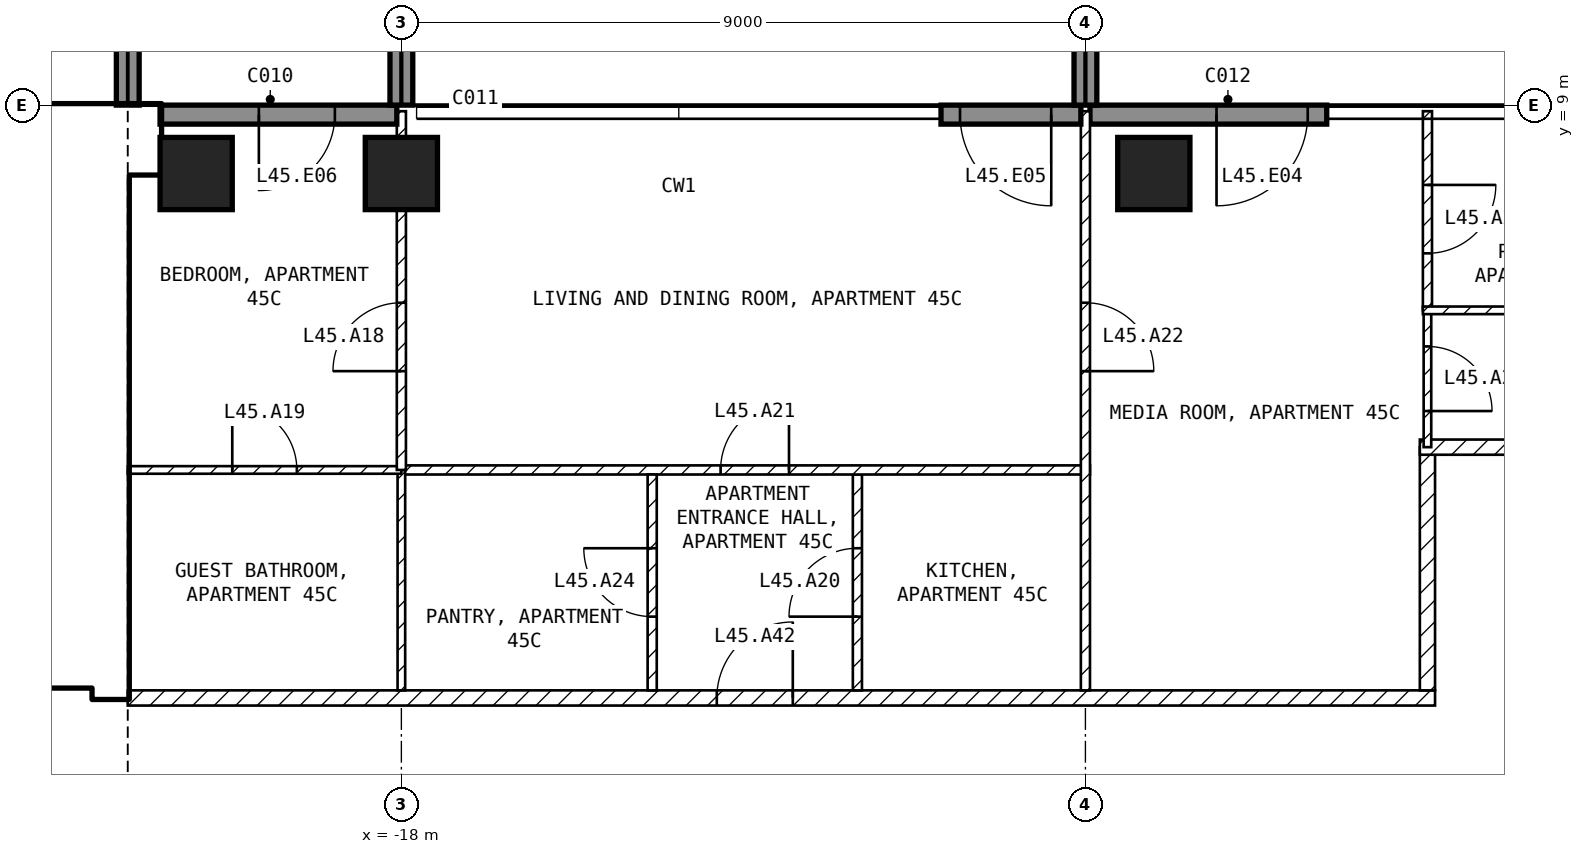
"""IFC4 building model, lengths in metres.
Left out: names, types, materials, properties, quantities, classifications, styles, units other than length and angle.
Written with IfcOpenShell. Run it as: python <this file> out.ifc"""

import sys

from ifc_helpers import new_model, si_unit, direction, frame, frame_2d, origin, origin_2d, place, context, subcontext, project, spatial, rectangle, extrude, element, fill, save


model = new_model("IFC4")
c1 = context("Model", 3, precision=1e-05, world=origin(), true_north=direction((0.0, 1.0)))
c2 = subcontext(c1, "Body", "Model", "MODEL_VIEW")
j1 = project(units=[si_unit("LENGTHUNIT", "METRE"), si_unit("PLANEANGLEUNIT", "RADIAN")], contexts=[c1])
p1 = place(None, origin())
s1 = spatial("IfcSite", under=j1, at=p1, CompositionType="ELEMENT")
p2 = place(p1, origin())
s2 = spatial("IfcBuilding", under=s1, at=p2, CompositionType="ELEMENT")
p3 = place(p2, frame((0.0, 0.0, 184.1)))
s3 = spatial("IfcBuildingStorey", under=s2, at=p3, CompositionType="ELEMENT", Elevation=184.1)
for number, where, z_axis, x_axis in (
    (1, (-20.7, 8.1, -0.25), (0.0, 0.0, 1.0), (1.0, 0.0, 0.0)),
    (2, (-18.0, 8.1, -0.25), (0.0, 0.0, 1.0), (1.0, 0.0, 0.0)),
    (3, (-8.1, 8.1, -0.25), (0.0, 0.0, 1.0), (1.0, 0.0, 0.0)),
):
    element("IfcColumn", number, at=place(p3, frame(where, z_axis=z_axis, x_axis=x_axis)), inside=s3, PredefinedType="COLUMN", context=c2, shape_type="SweptSolid", body=[
        extrude(rectangle(XDim=0.95, YDim=0.95, at=origin_2d()), origin(), (0.0, 0.0, 1.0), 3.5),
    ])
p4 = place(p3, frame((-5.825, 8.875, 0.0), z_axis=(0.0, 0.0, 1.0), x_axis=(-1.0, 0.0, 0.0)))
e4 = element("IfcWall", 4, at=p4, inside=s3, PredefinedType="SOLIDWALL", context=c2, shape_type="SweptSolid", body=[
    extrude(rectangle(XDim=3.115, YDim=0.25, at=frame_2d((1.558, 0.0))), origin(), (0.0, 0.0, 1.0), 3.25),
])
p5 = place(p4, frame((0.25, 0.0, 0.0)))
e5 = element("IfcOpeningElement", 5, at=p5, cuts=e4, PredefinedType="OPENING", context=c2, shape_type="SweptSolid", body=[
    extrude(rectangle(XDim=1.2, YDim=2.4, at=frame_2d((0.6, 1.2))), frame((0.0, 0.135, 0.0), z_axis=(0.0, -1.0, 0.0), x_axis=(1.0, 0.0, 0.0)), (0.0, 0.0, 1.0), 0.27),
])
p6 = place(p3, frame((-9.06, 8.875, 0.0), z_axis=(0.0, 0.0, 1.0), x_axis=(-1.0, 0.0, 0.0)))
e6 = element("IfcWall", 6, at=p6, inside=s3, PredefinedType="SOLIDWALL", context=c2, shape_type="SweptSolid", body=[
    extrude(rectangle(XDim=1.84, YDim=0.25, at=frame_2d((0.92, 0.0))), origin(), (0.0, 0.0, 1.0), 3.25),
])
p7 = place(p6, frame((0.39, 0.0, 0.0)))
e7 = element("IfcOpeningElement", 7, at=p7, cuts=e6, PredefinedType="OPENING", context=c2, shape_type="SweptSolid", body=[
    extrude(rectangle(XDim=1.2, YDim=2.4, at=frame_2d((0.6, 1.2))), frame((0.0, 0.135, 0.0), z_axis=(0.0, -1.0, 0.0), x_axis=(1.0, 0.0, 0.0)), (0.0, 0.0, 1.0), 0.27),
])
p8 = place(p3, frame((-18.06, 8.875, 0.0), z_axis=(0.0, 0.0, 1.0), x_axis=(-1.0, 0.0, 0.0)))
e8 = element("IfcWall", 8, at=p8, inside=s3, PredefinedType="SOLIDWALL", context=c2, shape_type="SweptSolid", body=[
    extrude(rectangle(XDim=3.115, YDim=0.25, at=frame_2d((1.558, 0.0))), origin(), (0.0, 0.0, 1.0), 3.25),
])
p9 = place(p8, frame((0.815, 0.0, 0.0)))
e9 = element("IfcOpeningElement", 9, at=p9, cuts=e8, PredefinedType="OPENING", context=c2, shape_type="SweptSolid", body=[
    extrude(rectangle(XDim=1.0, YDim=2.4, at=frame_2d((0.5, 1.2))), frame((0.0, 0.135, 0.0), z_axis=(0.0, -1.0, 0.0), x_axis=(1.0, 0.0, 0.0)), (0.0, 0.0, 1.0), 0.27),
])
for number, where, z_axis, x_axis in (
    (10, (-21.6, 9.0, 0.0), (0.0, 0.0, 1.0), (0.0, 1.0, 0.0)),
    (11, (-18.0, 9.0, 0.0), (0.0, 0.0, 1.0), (0.0, 1.0, 0.0)),
    (12, (-9.0, 9.0, 0.0), (0.0, 0.0, 1.0), (0.0, 1.0, 0.0)),
):
    element("IfcWall", number, at=place(p3, frame(where, z_axis=z_axis, x_axis=x_axis)), inside=s3, PredefinedType="SOLIDWALL", context=c2, shape_type="SweptSolid", body=[
        extrude(rectangle(XDim=2.7, YDim=0.3, at=frame_2d((1.35, 0.0))), origin(), (0.0, 0.0, 1.0), 3.25),
    ])
p10 = place(p3, frame((-29.6, 8.55, 0.0), z_axis=(0.0, 0.0, 1.0), x_axis=(1.0, 0.0, 0.0)))
e13 = element("IfcWall", 13, at=p10, inside=s3, PredefinedType="SHEAR", context=c2, shape_type="SweptSolid", body=[
    extrude(rectangle(XDim=8.425, YDim=0.9, at=frame_2d((4.212, 0.0))), origin(), (0.0, 0.0, 1.0), 3.25),
])
p11 = place(p3, frame((-21.825, 1.2, 0.0), z_axis=(0.0, 0.0, 1.0), x_axis=(0.0, 1.0, 0.0)))
e14 = element("IfcWall", 14, at=p11, inside=s3, PredefinedType="SHEAR", context=c2, shape_type="SweptSolid", body=[
    extrude(rectangle(XDim=6.9, YDim=0.45, at=frame_2d((3.45, 0.0))), origin(), (0.0, 0.0, 1.0), 3.25),
])
p12 = place(p3, frame((-33.2, 1.45, 0.0), z_axis=(0.0, 0.0, 1.0), x_axis=(1.0, 0.0, 0.0)))
e15 = element("IfcWall", 15, at=p12, inside=s3, PredefinedType="SOLIDWALL", context=c2, shape_type="SweptSolid", body=[
    extrude(rectangle(XDim=11.15, YDim=0.2, at=frame_2d((5.575, 0.0))), origin(), (0.0, 0.0, 1.0), 3.25),
])
p13 = place(p12, frame((9.4, 0.0, 0.0)))
e16 = element("IfcOpeningElement", 16, at=p13, cuts=e15, PredefinedType="OPENING", context=c2, shape_type="SweptSolid", body=[
    extrude(rectangle(XDim=1.0, YDim=2.1, at=frame_2d((0.5, 1.05))), frame((0.0, 0.11, 0.0), z_axis=(0.0, -1.0, 0.0), x_axis=(1.0, 0.0, 0.0)), (0.0, 0.0, 1.0), 0.22),
])
p14 = place(p12, frame((6.9, 0.0, 0.0)))
e17 = element("IfcOpeningElement", 17, at=p14, cuts=e15, PredefinedType="OPENING", context=c2, shape_type="SweptSolid", body=[
    extrude(rectangle(XDim=1.0, YDim=2.1, at=frame_2d((0.5, 1.05))), frame((0.0, 0.11, 0.0), z_axis=(0.0, -1.0, 0.0), x_axis=(1.0, 0.0, 0.0)), (0.0, 0.0, 1.0), 0.22),
])
p15 = place(p12, frame((1.1, 0.0, 0.0)))
e18 = element("IfcOpeningElement", 18, at=p15, cuts=e15, PredefinedType="OPENING", context=c2, shape_type="SweptSolid", body=[
    extrude(rectangle(XDim=0.9, YDim=2.1, at=frame_2d((0.45, 1.05))), frame((0.0, 0.11, 0.0), z_axis=(0.0, -1.0, 0.0), x_axis=(1.0, 0.0, 0.0)), (0.0, 0.0, 1.0), 0.22),
])
p16 = place(p3, frame((-28.35, 5.15, 0.0), z_axis=(0.0, 0.0, 1.0), x_axis=(1.0, 0.0, 0.0)))
e19 = element("IfcWall", 19, at=p16, inside=s3, PredefinedType="SOLIDWALL", context=c2, shape_type="SweptSolid", body=[
    extrude(rectangle(XDim=6.3, YDim=0.2, at=frame_2d((3.15, 0.0))), origin(), (0.0, 0.0, 1.0), 3.25),
])
p17 = place(p16, frame((5.1, 0.0, 0.0)))
e20 = element("IfcOpeningElement", 20, at=p17, cuts=e19, PredefinedType="OPENING", context=c2, shape_type="SweptSolid", body=[
    extrude(rectangle(XDim=1.0, YDim=2.1, at=frame_2d((0.5, 1.05))), frame((0.0, 0.11, 0.0), z_axis=(0.0, -1.0, 0.0), x_axis=(1.0, 0.0, 0.0)), (0.0, 0.0, 1.0), 0.22),
])
p18 = place(p3, frame((-21.6, 1.2, 0.0), z_axis=(0.0, 0.0, 1.0), x_axis=(1.0, 0.0, 0.0)))
e21 = element("IfcWall", 21, at=p18, inside=s3, PredefinedType="PARTITIONING", context=c2, shape_type="SweptSolid", body=[
    extrude(rectangle(XDim=17.2, YDim=0.2, at=frame_2d((8.6, 0.0))), origin(), (0.0, 0.0, 1.0), 3.25),
])
p19 = place(p18, frame((7.75, 0.0, 0.0)))
e22 = element("IfcOpeningElement", 22, at=p19, cuts=e21, PredefinedType="OPENING", context=c2, shape_type="SweptSolid", body=[
    extrude(rectangle(XDim=1.0, YDim=2.1, at=frame_2d((0.5, 1.05))), frame((0.0, 0.11, 0.0), z_axis=(0.0, -1.0, 0.0), x_axis=(1.0, 0.0, 0.0)), (0.0, 0.0, 1.0), 0.22),
])
p20 = place(p3, frame((-4.5, 1.3, 0.0), z_axis=(0.0, 0.0, 1.0), x_axis=(0.0, 1.0, 0.0)))
e23 = element("IfcWall", 23, at=p20, inside=s3, PredefinedType="PARTITIONING", context=c2, shape_type="SweptSolid", body=[
    extrude(rectangle(XDim=3.2, YDim=0.2, at=frame_2d((1.6, 0.0))), origin(), (0.0, 0.0, 1.0), 3.25),
])
p21 = place(p3, frame((-4.6, 4.5, 0.0), z_axis=(0.0, 0.0, 1.0), x_axis=(1.0, 0.0, 0.0)))
e24 = element("IfcWall", 24, at=p21, inside=s3, PredefinedType="PARTITIONING", context=c2, shape_type="SweptSolid", body=[
    extrude(rectangle(XDim=3.5, YDim=0.2, at=frame_2d((1.75, 0.0))), origin(), (0.0, 0.0, 1.0), 3.25),
])
p22 = place(p3, frame((-12.0, 1.3, 0.0), z_axis=(0.0, 0.0, 1.0), x_axis=(0.0, 1.0, 0.0)))
e25 = element("IfcWall", 25, at=p22, inside=s3, PredefinedType="PARTITIONING", context=c2, shape_type="SweptSolid", body=[
    extrude(rectangle(XDim=2.84, YDim=0.12, at=frame_2d((1.42, 0.0))), origin(), (0.0, 0.0, 1.0), 3.25),
])
p23 = place(p22, frame((0.97, 0.0, 0.0)))
e26 = element("IfcOpeningElement", 26, at=p23, cuts=e25, PredefinedType="OPENING", context=c2, shape_type="SweptSolid", body=[
    extrude(rectangle(XDim=0.9, YDim=2.1, at=frame_2d((0.45, 1.05))), frame((0.0, 0.07, 0.0), z_axis=(0.0, -1.0, 0.0), x_axis=(1.0, 0.0, 0.0)), (0.0, 0.0, 1.0), 0.14),
])
p24 = place(p3, frame((-18.0, 4.2, 0.0), z_axis=(0.0, 0.0, 1.0), x_axis=(1.0, 0.0, 0.0)))
e27 = element("IfcWall", 27, at=p24, inside=s3, PredefinedType="PARTITIONING", context=c2, shape_type="SweptSolid", body=[
    extrude(rectangle(XDim=9.06, YDim=0.12, at=frame_2d((4.53, 0.0))), origin(), (0.0, 0.0, 1.0), 3.25),
])
p25 = place(p24, frame((4.2, 0.0, 0.0)))
e28 = element("IfcOpeningElement", 28, at=p25, cuts=e27, PredefinedType="OPENING", context=c2, shape_type="SweptSolid", body=[
    extrude(rectangle(XDim=0.9, YDim=2.1, at=frame_2d((0.45, 1.05))), frame((0.0, 0.07, 0.0), z_axis=(0.0, -1.0, 0.0), x_axis=(1.0, 0.0, 0.0)), (0.0, 0.0, 1.0), 0.14),
])
p26 = place(p3, frame((-9.0, 8.92, 0.0), z_axis=(0.0, 0.0, 1.0), x_axis=(0.0, -1.0, 0.0)))
e29 = element("IfcWall", 29, at=p26, inside=s3, PredefinedType="PARTITIONING", context=c2, shape_type="SweptSolid", body=[
    extrude(rectangle(XDim=7.62, YDim=0.12, at=frame_2d((3.81, 0.0))), origin(), (0.0, 0.0, 1.0), 3.25),
])
p27 = place(p26, frame((2.52, 0.0, 0.0)))
e30 = element("IfcOpeningElement", 30, at=p27, cuts=e29, PredefinedType="OPENING", context=c2, shape_type="SweptSolid", body=[
    extrude(rectangle(XDim=0.9, YDim=2.1, at=frame_2d((0.45, 1.05))), frame((0.0, 0.07, 0.0), z_axis=(0.0, -1.0, 0.0), x_axis=(1.0, 0.0, 0.0)), (0.0, 0.0, 1.0), 0.14),
])
p28 = place(p3, frame((-14.7, 1.3, 0.0), z_axis=(0.0, 0.0, 1.0), x_axis=(0.0, 1.0, 0.0)))
e31 = element("IfcWall", 31, at=p28, inside=s3, PredefinedType="PARTITIONING", context=c2, shape_type="SweptSolid", body=[
    extrude(rectangle(XDim=2.84, YDim=0.12, at=frame_2d((1.42, 0.0))), origin(), (0.0, 0.0, 1.0), 3.25),
])
p29 = place(p28, frame((0.97, 0.0, 0.0)))
e32 = element("IfcOpeningElement", 32, at=p29, cuts=e31, PredefinedType="OPENING", context=c2, shape_type="SweptSolid", body=[
    extrude(rectangle(XDim=0.9, YDim=2.1, at=frame_2d((0.45, 1.05))), frame((0.0, 0.07, 0.0), z_axis=(0.0, -1.0, 0.0), x_axis=(1.0, 0.0, 0.0)), (0.0, 0.0, 1.0), 0.14),
])
p30 = place(p3, frame((-18.0, 1.3, 0.0), z_axis=(0.0, 0.0, 1.0), x_axis=(0.0, 1.0, 0.0)))
e33 = element("IfcWall", 33, at=p30, inside=s3, PredefinedType="PARTITIONING", context=c2, shape_type="SweptSolid", body=[
    extrude(rectangle(XDim=2.9, YDim=0.1, at=frame_2d((1.45, 0.0))), origin(), (0.0, 0.0, 1.0), 2.48),
])
p31 = place(p3, frame((-21.6, 4.2, 0.0), z_axis=(0.0, 0.0, 1.0), x_axis=(1.0, 0.0, 0.0)))
e34 = element("IfcWall", 34, at=p31, inside=s3, PredefinedType="PARTITIONING", context=c2, shape_type="SweptSolid", body=[
    extrude(rectangle(XDim=3.6, YDim=0.1, at=frame_2d((1.8, 0.0))), origin(), (0.0, 0.0, 1.0), 3.25),
])
p32 = place(p31, frame((1.375, 0.0, 0.0)))
e35 = element("IfcOpeningElement", 35, at=p32, cuts=e34, PredefinedType="OPENING", context=c2, shape_type="SweptSolid", body=[
    extrude(rectangle(XDim=0.85, YDim=2.1, at=frame_2d((0.425, 1.05))), frame((0.0, 0.06, 0.0), z_axis=(0.0, -1.0, 0.0), x_axis=(1.0, 0.0, 0.0)), (0.0, 0.0, 1.0), 0.12),
])
p33 = place(p3, frame((-18.0, 4.2, 0.0), z_axis=(0.0, 0.0, 1.0), x_axis=(0.0, 1.0, 0.0)))
e36 = element("IfcWall", 36, at=p33, inside=s3, PredefinedType="PARTITIONING", context=c2, shape_type="SweptSolid", body=[
    extrude(rectangle(XDim=4.72, YDim=0.12, at=frame_2d((2.36, 0.0))), origin(), (0.0, 0.0, 1.0), 2.48),
])
p34 = place(p33, frame((1.3, 0.0, 0.0)))
e37 = element("IfcOpeningElement", 37, at=p34, cuts=e36, PredefinedType="OPENING", context=c2, shape_type="SweptSolid", body=[
    extrude(rectangle(XDim=0.9, YDim=2.1, at=frame_2d((0.45, 1.05))), frame((0.0, 0.07, 0.0), z_axis=(0.0, -1.0, 0.0), x_axis=(1.0, 0.0, 0.0)), (0.0, 0.0, 1.0), 0.14),
])
p35 = place(p3, frame((-4.5, 6.3, 0.0), z_axis=(0.0, 0.0, 1.0), x_axis=(0.0, -1.0, 0.0)))
e38 = element("IfcWall", 38, at=p35, inside=s3, PredefinedType="PARTITIONING", context=c2, shape_type="SweptSolid", body=[
    extrude(rectangle(XDim=1.8, YDim=0.1, at=frame_2d((0.9, 0.0))), origin(), (0.0, 0.0, 1.0), 3.25),
])
p36 = place(p35, frame((0.475, 0.0, 0.0)))
e39 = element("IfcOpeningElement", 39, at=p36, cuts=e38, PredefinedType="OPENING", context=c2, shape_type="SweptSolid", body=[
    extrude(rectangle(XDim=0.85, YDim=2.1, at=frame_2d((0.425, 1.05))), frame((0.0, 0.06, 0.0), z_axis=(0.0, -1.0, 0.0), x_axis=(1.0, 0.0, 0.0)), (0.0, 0.0, 1.0), 0.12),
])
p37 = place(p3, frame((-4.5, 8.92, 0.0), z_axis=(0.0, 0.0, 1.0), x_axis=(0.0, -1.0, 0.0)))
e40 = element("IfcWall", 40, at=p37, inside=s3, PredefinedType="PARTITIONING", context=c2, shape_type="SweptSolid", body=[
    extrude(rectangle(XDim=2.62, YDim=0.12, at=frame_2d((1.31, 0.0))), origin(), (0.0, 0.0, 1.0), 3.25),
])
p38 = place(p37, frame((0.97, 0.0, 0.0)))
e41 = element("IfcOpeningElement", 41, at=p38, cuts=e40, PredefinedType="OPENING", context=c2, shape_type="SweptSolid", body=[
    extrude(rectangle(XDim=0.9, YDim=2.1, at=frame_2d((0.45, 1.05))), frame((0.0, 0.07, 0.0), z_axis=(0.0, -1.0, 0.0), x_axis=(1.0, 0.0, 0.0)), (0.0, 0.0, 1.0), 0.14),
])
p39 = place(p3, frame((-4.56, 6.3, 0.0), z_axis=(0.0, 0.0, 1.0), x_axis=(1.0, 0.0, 0.0)))
e42 = element("IfcWall", 42, at=p39, inside=s3, PredefinedType="PARTITIONING", context=c2, shape_type="SweptSolid", body=[
    extrude(rectangle(XDim=3.46, YDim=0.1, at=frame_2d((1.73, 0.0))), origin(), (0.0, 0.0, 1.0), 3.25),
])
p40 = place(p5, origin())
e43 = element("IfcDoor", 43, at=p40, inside=s3, OperationType="SINGLE_SWING_RIGHT", PredefinedType="DOOR", context=c2, shape_type="SweptSolid", body=[
    extrude(rectangle(XDim=1.2, YDim=2.4, at=frame_2d((0.6, 1.2))), frame((0.0, 0.025, 0.0), z_axis=(0.0, -1.0, 0.0), x_axis=(1.0, 0.0, 0.0)), (0.0, 0.0, 1.0), 0.05),
])
fill(e5, e43)
p41 = place(p7, origin())
e44 = element("IfcDoor", 44, at=p41, inside=s3, OperationType="SINGLE_SWING_LEFT", PredefinedType="DOOR", context=c2, shape_type="SweptSolid", body=[
    extrude(rectangle(XDim=1.2, YDim=2.4, at=frame_2d((0.6, 1.2))), frame((0.0, 0.025, 0.0), z_axis=(0.0, -1.0, 0.0), x_axis=(1.0, 0.0, 0.0)), (0.0, 0.0, 1.0), 0.05),
])
fill(e7, e44)
p42 = place(p9, origin())
e45 = element("IfcDoor", 45, at=p42, inside=s3, OperationType="SINGLE_SWING_RIGHT", PredefinedType="DOOR", context=c2, shape_type="SweptSolid", body=[
    extrude(rectangle(XDim=1.0, YDim=2.4, at=frame_2d((0.5, 1.2))), frame((0.0, 0.025, 0.0), z_axis=(0.0, -1.0, 0.0), x_axis=(1.0, 0.0, 0.0)), (0.0, 0.0, 1.0), 0.05),
])
fill(e9, e45)
p43 = place(p17, origin())
e46 = element("IfcDoor", 46, at=p43, inside=s3, OperationType="SINGLE_SWING_LEFT", PredefinedType="DOOR", context=c2, shape_type="SweptSolid", body=[
    extrude(rectangle(XDim=1.0, YDim=2.1, at=frame_2d((0.5, 1.05))), frame((0.0, 0.025, 0.0), z_axis=(0.0, -1.0, 0.0), x_axis=(1.0, 0.0, 0.0)), (0.0, 0.0, 1.0), 0.05),
])
fill(e20, e46)
p44 = place(p34, origin())
e47 = element("IfcDoor", 47, at=p44, inside=s3, OperationType="SINGLE_SWING_LEFT", PredefinedType="DOOR", context=c2, shape_type="SweptSolid", body=[
    extrude(rectangle(XDim=0.9, YDim=2.1, at=frame_2d((0.45, 1.05))), frame((0.0, 0.025, 0.0), z_axis=(0.0, -1.0, 0.0), x_axis=(1.0, 0.0, 0.0)), (0.0, 0.0, 1.0), 0.05),
])
fill(e37, e47)
p45 = place(p32, origin())
e48 = element("IfcDoor", 48, at=p45, inside=s3, OperationType="SINGLE_SWING_LEFT", PredefinedType="DOOR", context=c2, shape_type="SweptSolid", body=[
    extrude(rectangle(XDim=0.85, YDim=2.1, at=frame_2d((0.425, 1.05))), frame((0.0, 0.025, 0.0), z_axis=(0.0, -1.0, 0.0), x_axis=(1.0, 0.0, 0.0)), (0.0, 0.0, 1.0), 0.05),
])
fill(e35, e48)
p46 = place(p23, origin())
e49 = element("IfcDoor", 49, at=p46, inside=s3, OperationType="SINGLE_SWING_LEFT", PredefinedType="DOOR", context=c2, shape_type="SweptSolid", body=[
    extrude(rectangle(XDim=0.9, YDim=2.1, at=frame_2d((0.45, 1.05))), frame((0.0, 0.025, 0.0), z_axis=(0.0, -1.0, 0.0), x_axis=(1.0, 0.0, 0.0)), (0.0, 0.0, 1.0), 0.05),
])
fill(e26, e49)
p47 = place(p25, origin())
e50 = element("IfcDoor", 50, at=p47, inside=s3, OperationType="SINGLE_SWING_RIGHT", PredefinedType="DOOR", context=c2, shape_type="SweptSolid", body=[
    extrude(rectangle(XDim=0.9, YDim=2.1, at=frame_2d((0.45, 1.05))), frame((0.0, 0.025, 0.0), z_axis=(0.0, -1.0, 0.0), x_axis=(1.0, 0.0, 0.0)), (0.0, 0.0, 1.0), 0.05),
])
fill(e28, e50)
p48 = place(p27, origin())
e51 = element("IfcDoor", 51, at=p48, inside=s3, OperationType="SINGLE_SWING_RIGHT", PredefinedType="DOOR", context=c2, shape_type="SweptSolid", body=[
    extrude(rectangle(XDim=0.9, YDim=2.1, at=frame_2d((0.45, 1.05))), frame((0.0, 0.025, 0.0), z_axis=(0.0, -1.0, 0.0), x_axis=(1.0, 0.0, 0.0)), (0.0, 0.0, 1.0), 0.05),
])
fill(e30, e51)
p49 = place(p38, origin())
e52 = element("IfcDoor", 52, at=p49, inside=s3, OperationType="SINGLE_SWING_LEFT", PredefinedType="DOOR", context=c2, shape_type="SweptSolid", body=[
    extrude(rectangle(XDim=0.9, YDim=2.1, at=frame_2d((0.45, 1.05))), frame((0.0, 0.025, 0.0), z_axis=(0.0, -1.0, 0.0), x_axis=(1.0, 0.0, 0.0)), (0.0, 0.0, 1.0), 0.05),
])
fill(e41, e52)
p50 = place(p29, origin())
e53 = element("IfcDoor", 53, at=p50, inside=s3, OperationType="SINGLE_SWING_RIGHT", PredefinedType="DOOR", context=c2, shape_type="SweptSolid", body=[
    extrude(rectangle(XDim=0.9, YDim=2.1, at=frame_2d((0.45, 1.05))), frame((0.0, 0.025, 0.0), z_axis=(0.0, -1.0, 0.0), x_axis=(1.0, 0.0, 0.0)), (0.0, 0.0, 1.0), 0.05),
])
fill(e32, e53)
p51 = place(p36, origin())
e54 = element("IfcDoor", 54, at=p51, inside=s3, OperationType="SINGLE_SWING_RIGHT", PredefinedType="DOOR", context=c2, shape_type="SweptSolid", body=[
    extrude(rectangle(XDim=0.85, YDim=2.1, at=frame_2d((0.425, 1.05))), frame((0.0, 0.025, 0.0), z_axis=(0.0, -1.0, 0.0), x_axis=(1.0, 0.0, 0.0)), (0.0, 0.0, 1.0), 0.05),
])
fill(e39, e54)
p52 = place(p19, origin())
e55 = element("IfcDoor", 55, at=p52, inside=s3, OperationType="SINGLE_SWING_RIGHT", PredefinedType="DOOR", context=c2, shape_type="SweptSolid", body=[
    extrude(rectangle(XDim=1.0, YDim=2.1, at=frame_2d((0.5, 1.05))), frame((0.0, 0.025, 0.0), z_axis=(0.0, -1.0, 0.0), x_axis=(1.0, 0.0, 0.0)), (0.0, 0.0, 1.0), 0.05),
])
fill(e22, e55)
save(model, sys.argv[1])
